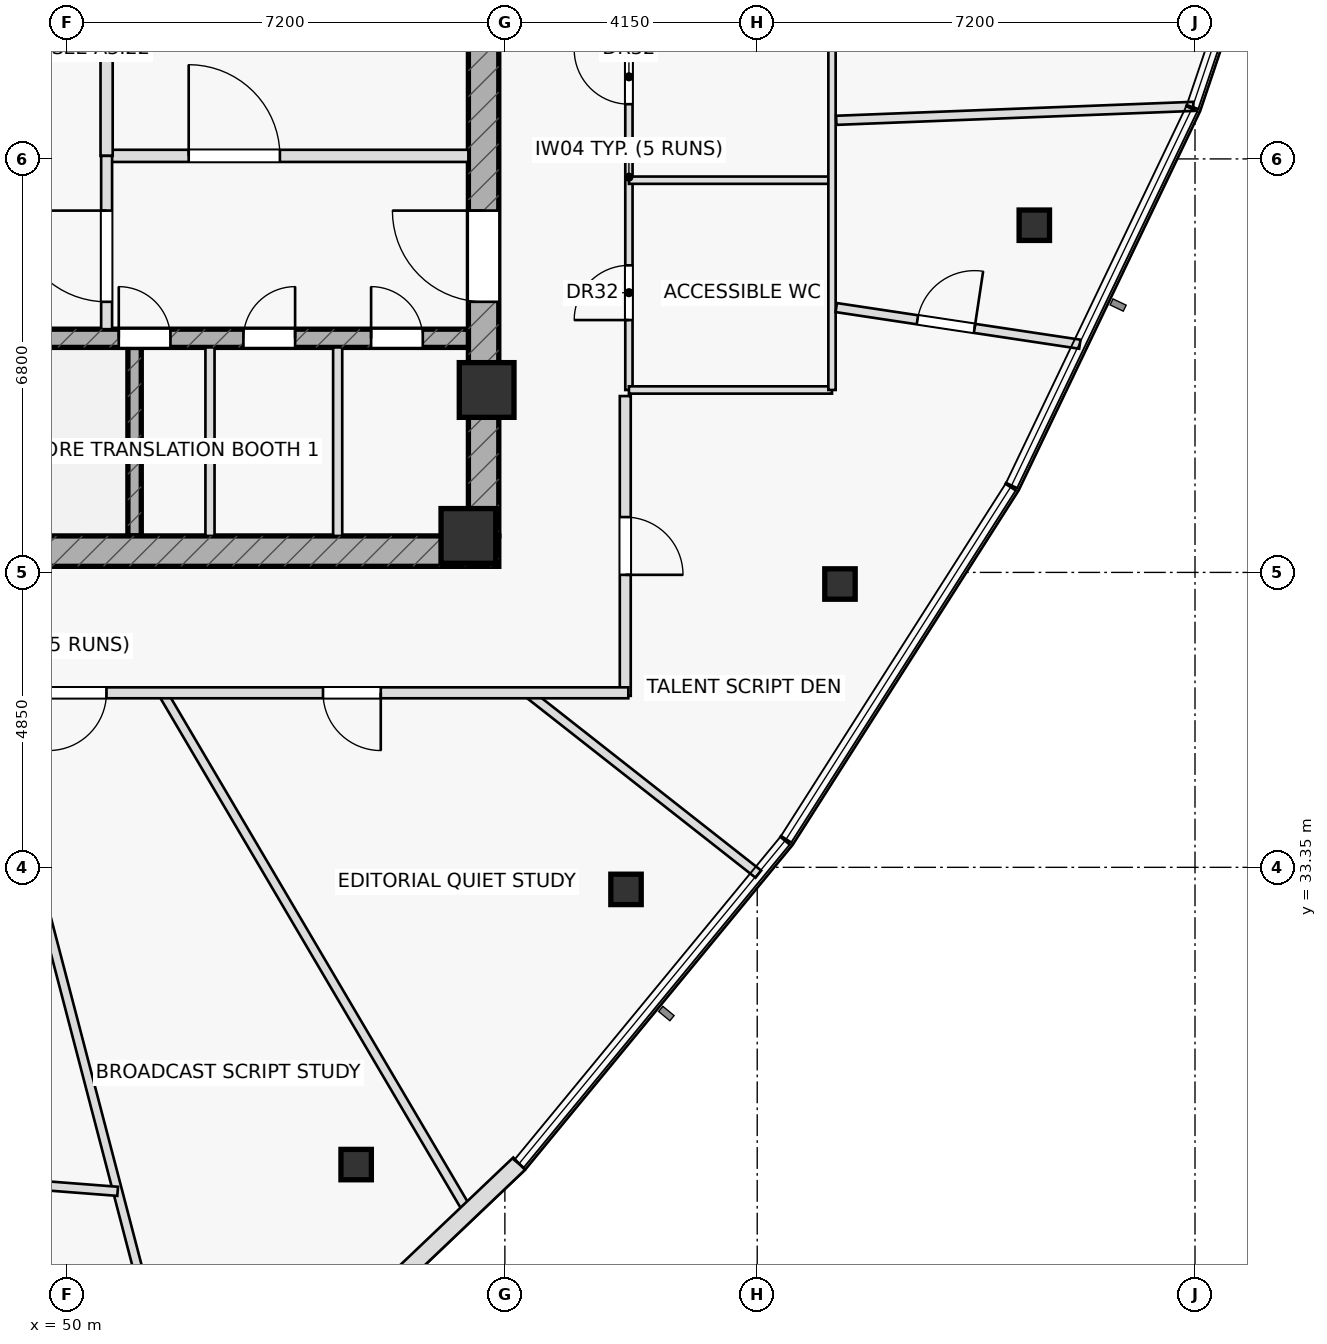
"""IFC4 building model, lengths in metres.
Left out: names, types, materials, properties, quantities, classifications, styles, units other than length and angle.
Written with IfcOpenShell. Run it as: python <this file> out.ifc"""

import sys

from ifc_helpers import new_model, si_unit, direction, frame, frame_2d, origin, origin_2d, place, context, subcontext, project, spatial, rectangle, hollow_rectangle, extrude, element, fill, save


model = new_model("IFC4")
c1 = context("Model", 3, precision=1e-05, world=origin(), true_north=direction((0.0, 1.0)))
c2 = subcontext(c1, "Body", "Model", "MODEL_VIEW")
j1 = project(units=[si_unit("LENGTHUNIT", "METRE"), si_unit("PLANEANGLEUNIT", "RADIAN")], contexts=[c1])
p1 = place(None, origin())
s1 = spatial("IfcSite", under=j1, at=p1, CompositionType="ELEMENT")
p2 = place(p1, origin())
s2 = spatial("IfcBuilding", under=s1, at=p2, CompositionType="ELEMENT")
p3 = place(p2, frame((0.0, 0.0, 269.55)))
s3 = spatial("IfcBuildingStorey", under=s2, at=p3, CompositionType="ELEMENT", Elevation=269.55)
p4 = place(p3, frame((51.11, 38.8, 0.0), z_axis=(0.0, 0.0, 1.0), x_axis=(0.0, 1.0, 0.0)))
e1 = element("IfcWall", 1, at=p4, inside=s3, PredefinedType="SHEAR", context=c2, shape_type="SweptSolid", body=[
    extrude(rectangle(XDim=3.1, YDim=0.22, at=frame_2d((1.55, 0.0))), origin(), (0.0, 0.0, 1.0), 3.5),
])
p5 = place(p3, frame((42.9, 38.55, 0.0), z_axis=(0.0, 0.0, 1.0), x_axis=(1.0, 0.0, 0.0)))
e2 = element("IfcWall", 2, at=p5, inside=s3, PredefinedType="SHEAR", context=c2, shape_type="SweptSolid", body=[
    extrude(rectangle(XDim=14.2, YDim=0.5, at=frame_2d((7.1, 0.0))), origin(), (0.0, 0.0, 1.0), 3.5),
])
p6 = place(p5, frame((0.78, 0.0, 0.0)))
e3 = element("IfcOpeningElement", 3, at=p6, cuts=e2, PredefinedType="OPENING", context=c2, shape_type="SweptSolid", body=[
    extrude(rectangle(XDim=1.05, YDim=2.2, at=frame_2d((0.525, 1.1))), frame((0.0, 0.26, 0.0), z_axis=(0.0, -1.0, 0.0), x_axis=(1.0, 0.0, 0.0)), (0.0, 0.0, 1.0), 0.52),
])
p7 = place(p3, frame((56.85, 38.8, 0.0), z_axis=(0.0, 0.0, 1.0), x_axis=(0.0, 1.0, 0.0)))
e4 = element("IfcWall", 4, at=p7, inside=s3, PredefinedType="SHEAR", context=c2, shape_type="SweptSolid", body=[
    extrude(rectangle(XDim=12.4, YDim=0.5, at=frame_2d((6.2, 0.0))), origin(), (0.0, 0.0, 1.0), 3.5),
])
p8 = place(p7, frame((3.85, 0.0, 0.0)))
e5 = element("IfcOpeningElement", 5, at=p8, cuts=e4, PredefinedType="OPENING", context=c2, shape_type="SweptSolid", body=[
    extrude(rectangle(XDim=1.5, YDim=2.2, at=frame_2d((0.75, 1.1))), frame((0.0, 0.26, 0.0), z_axis=(0.0, -1.0, 0.0), x_axis=(1.0, 0.0, 0.0)), (0.0, 0.0, 1.0), 0.52),
])
p9 = place(p3, frame((43.4, 42.05, 0.0), z_axis=(0.0, 0.0, 1.0), x_axis=(1.0, 0.0, 0.0)))
e6 = element("IfcWall", 6, at=p9, inside=s3, PredefinedType="SHEAR", context=c2, shape_type="SweptSolid", body=[
    extrude(rectangle(XDim=13.2, YDim=0.3, at=frame_2d((6.6, 0.0))), origin(), (0.0, 0.0, 1.0), 3.5),
])
p10 = place(p9, frame((7.45, 0.0, 0.0)))
e7 = element("IfcOpeningElement", 7, at=p10, cuts=e6, PredefinedType="OPENING", context=c2, shape_type="SweptSolid", body=[
    extrude(rectangle(XDim=0.85, YDim=2.05, at=frame_2d((0.425, 1.025))), frame((0.0, 0.16, 0.0), z_axis=(0.0, -1.0, 0.0), x_axis=(1.0, 0.0, 0.0)), (0.0, 0.0, 1.0), 0.32),
])
p11 = place(p9, frame((9.5, 0.0, 0.0)))
e8 = element("IfcOpeningElement", 8, at=p11, cuts=e6, PredefinedType="OPENING", context=c2, shape_type="SweptSolid", body=[
    extrude(rectangle(XDim=0.85, YDim=2.05, at=frame_2d((0.425, 1.025))), frame((0.0, 0.16, 0.0), z_axis=(0.0, -1.0, 0.0), x_axis=(1.0, 0.0, 0.0)), (0.0, 0.0, 1.0), 0.32),
])
p12 = place(p9, frame((11.6, 0.0, 0.0)))
e9 = element("IfcOpeningElement", 9, at=p12, cuts=e6, PredefinedType="OPENING", context=c2, shape_type="SweptSolid", body=[
    extrude(rectangle(XDim=0.85, YDim=2.05, at=frame_2d((0.425, 1.025))), frame((0.0, 0.16, 0.0), z_axis=(0.0, -1.0, 0.0), x_axis=(1.0, 0.0, 0.0)), (0.0, 0.0, 1.0), 0.32),
])
for number, where, z_axis, x_axis in (
    (10, (56.9, 41.2, 0.0), (0.0, 0.0, 1.0), (1.0, 0.0, 0.0)),
    (11, (56.6, 38.8, 0.0), (0.0, 0.0, 1.0), (1.0, 0.0, 0.0)),
):
    element("IfcColumn", number, at=place(p3, frame(where, z_axis=z_axis, x_axis=x_axis)), inside=s3, PredefinedType="COLUMN", context=c2, shape_type="SweptSolid", body=[
        extrude(rectangle(XDim=0.9, YDim=0.9, at=origin_2d()), origin(), (0.0, 0.0, 1.0), 3.5),
    ])
for number, where, z_axis, x_axis in (
    (12, (54.754, 28.462, 0.0), (0.0, 0.0, 1.0), (1.0, 0.0, 0.0)),
    (13, (59.192, 32.987, 0.0), (0.0, 0.0, 1.0), (1.0, 0.0, 0.0)),
    (14, (62.711, 38.009, 0.0), (0.0, 0.0, 1.0), (1.0, 0.0, 0.0)),
    (15, (65.907, 43.909, 0.0), (0.0, 0.0, 1.0), (1.0, 0.0, 0.0)),
):
    element("IfcColumn", number, at=place(p3, frame(where, z_axis=z_axis, x_axis=x_axis)), inside=s3, PredefinedType="COLUMN", context=c2, shape_type="SweptSolid", body=[
        extrude(hollow_rectangle(XDim=0.5, YDim=0.5, WallThickness=0.03, at=origin_2d()), origin(), (0.0, 0.0, 1.0), 3.5),
    ])
p13 = place(p3, frame((50.65, 45.05, 0.0), z_axis=(0.0, 0.0, 1.0), x_axis=(1.0, 0.0, 0.0)))
e16 = element("IfcWall", 16, at=p13, inside=s3, PredefinedType="PARTITIONING", context=c2, shape_type="SweptSolid", body=[
    extrude(rectangle(XDim=5.95, YDim=0.2, at=frame_2d((2.975, 0.0))), origin(), (0.0, 0.0, 1.0), 3.5),
])
p14 = place(p13, frame((1.35, 0.0, 0.0)))
e17 = element("IfcOpeningElement", 17, at=p14, cuts=e16, PredefinedType="OPENING", context=c2, shape_type="SweptSolid", body=[
    extrude(rectangle(XDim=1.5, YDim=2.2, at=frame_2d((0.75, 1.1))), frame((0.0, 0.11, 0.0), z_axis=(0.0, -1.0, 0.0), x_axis=(1.0, 0.0, 0.0)), (0.0, 0.0, 1.0), 0.22),
])
p15 = place(p3, frame((50.65, 45.05, 0.0), z_axis=(0.0, 0.0, 1.0), x_axis=(0.0, 1.0, 0.0)))
e18 = element("IfcWall", 18, at=p15, inside=s3, PredefinedType="PARTITIONING", context=c2, shape_type="SweptSolid", body=[
    extrude(rectangle(XDim=2.75, YDim=0.2, at=frame_2d((1.375, 0.0))), origin(), (0.0, 0.0, 1.0), 3.5),
])
p16 = place(p3, frame((50.65, 42.2, 0.0), z_axis=(0.0, 0.0, 1.0), x_axis=(0.0, 1.0, 0.0)))
e19 = element("IfcWall", 19, at=p16, inside=s3, PredefinedType="PARTITIONING", context=c2, shape_type="SweptSolid", body=[
    extrude(rectangle(XDim=2.85, YDim=0.18, at=frame_2d((1.425, 0.0))), origin(), (0.0, 0.0, 1.0), 3.5),
])
p17 = place(p16, frame((0.45, 0.0, 0.0)))
e20 = element("IfcOpeningElement", 20, at=p17, cuts=e19, PredefinedType="OPENING", context=c2, shape_type="SweptSolid", body=[
    extrude(rectangle(XDim=1.5, YDim=2.2, at=frame_2d((0.75, 1.1))), frame((0.0, 0.1, 0.0), z_axis=(0.0, -1.0, 0.0), x_axis=(1.0, 0.0, 0.0)), (0.0, 0.0, 1.0), 0.2),
])
for number, where, z_axis, x_axis in (
    (21, (52.35, 38.8, 0.0), (0.0, 0.0, 1.0), (0.0, 1.0, 0.0)),
    (22, (54.45, 38.8, 0.0), (0.0, 0.0, 1.0), (0.0, 1.0, 0.0)),
):
    element("IfcWall", number, at=place(p3, frame(where, z_axis=z_axis, x_axis=x_axis)), inside=s3, PredefinedType="PARTITIONING", context=c2, shape_type="SweptSolid", body=[
        extrude(rectangle(XDim=3.1, YDim=0.15, at=frame_2d((1.55, 0.0))), origin(), (0.0, 0.0, 1.0), 3.5),
    ])
p18 = place(p3, frame((59.24, 41.2, 0.0), z_axis=(0.0, 0.0, 1.0), x_axis=(0.0, 1.0, 0.0)))
e23 = element("IfcWall", 23, at=p18, inside=s3, PredefinedType="PARTITIONING", context=c2, shape_type="SweptSolid", body=[
    extrude(rectangle(XDim=7.0, YDim=0.12, at=frame_2d((3.5, 0.0))), origin(), (0.0, 0.0, 1.0), 3.5),
])
p19 = place(p18, frame((1.15, 0.0, 0.0)))
e24 = element("IfcOpeningElement", 24, at=p19, cuts=e23, PredefinedType="OPENING", context=c2, shape_type="SweptSolid", body=[
    extrude(rectangle(XDim=0.9, YDim=2.05, at=frame_2d((0.45, 1.025))), frame((0.0, 0.07, 0.0), z_axis=(0.0, -1.0, 0.0), x_axis=(1.0, 0.0, 0.0)), (0.0, 0.0, 1.0), 0.14),
])
p20 = place(p18, frame((4.7, 0.0, 0.0)))
e25 = element("IfcOpeningElement", 25, at=p20, cuts=e23, PredefinedType="OPENING", context=c2, shape_type="SweptSolid", body=[
    extrude(rectangle(XDim=0.9, YDim=2.05, at=frame_2d((0.45, 1.025))), frame((0.0, 0.07, 0.0), z_axis=(0.0, -1.0, 0.0), x_axis=(1.0, 0.0, 0.0)), (0.0, 0.0, 1.0), 0.14),
])
p21 = place(p3, frame((59.24, 41.2, 0.0), z_axis=(0.0, 0.0, 1.0), x_axis=(1.0, 0.0, 0.0)))
e26 = element("IfcWall", 26, at=p21, inside=s3, PredefinedType="PARTITIONING", context=c2, shape_type="SweptSolid", body=[
    extrude(rectangle(XDim=3.34, YDim=0.12, at=frame_2d((1.67, 0.0))), origin(), (0.0, 0.0, 1.0), 2.195),
])
p22 = place(p3, frame((59.24, 44.65, 0.0), z_axis=(0.0, 0.0, 1.0), x_axis=(1.0, 0.0, 0.0)))
e27 = element("IfcWall", 27, at=p22, inside=s3, PredefinedType="PARTITIONING", context=c2, shape_type="SweptSolid", body=[
    extrude(rectangle(XDim=3.34, YDim=0.12, at=frame_2d((1.67, 0.0))), origin(), (0.0, 0.0, 1.0), 3.5),
])
p23 = place(p3, frame((62.58, 41.2, 0.0), z_axis=(0.0, 0.0, 1.0), x_axis=(0.0, 1.0, 0.0)))
e28 = element("IfcWall", 28, at=p23, inside=s3, PredefinedType="PARTITIONING", context=c2, shape_type="SweptSolid", body=[
    extrude(rectangle(XDim=7.0, YDim=0.12, at=frame_2d((3.5, 0.0))), origin(), (0.0, 0.0, 1.0), 2.195),
])
p24 = place(p3, frame((48.692, 36.22, 0.0), z_axis=(0.0, 0.0, 1.0), x_axis=(0.25255026426, -0.967583776229, 0.0)))
e29 = element("IfcWall", 29, at=p24, inside=s3, PredefinedType="PARTITIONING", context=c2, shape_type="SweptSolid", body=[
    extrude(rectangle(XDim=13.239, YDim=0.15, at=frame_2d((6.62, 0.0))), origin(), (0.0, 0.0, 1.0), 2.195),
])
p25 = place(p3, frame((51.571, 36.22, 0.0), z_axis=(0.0, 0.0, 1.0), x_axis=(0.507449243591, -0.861681649555, 0.0)))
e30 = element("IfcWall", 30, at=p25, inside=s3, PredefinedType="PARTITIONING", context=c2, shape_type="SweptSolid", body=[
    extrude(rectangle(XDim=9.919, YDim=0.15, at=frame_2d((4.959, 0.0))), origin(), (0.0, 0.0, 1.0), 2.195),
])
p26 = place(p3, frame((57.574, 36.22, 0.0), z_axis=(0.0, 0.0, 1.0), x_axis=(0.786283227173, -0.617866236872, 0.0)))
e31 = element("IfcWall", 31, at=p26, inside=s3, PredefinedType="PARTITIONING", context=c2, shape_type="SweptSolid", body=[
    extrude(rectangle(XDim=4.826, YDim=0.15, at=frame_2d((2.413, 0.0))), origin(), (0.0, 0.0, 1.0), 2.195),
])
p27 = place(p3, frame((62.65, 42.555, 0.0), z_axis=(0.0, 0.0, 1.0), x_axis=(0.98886728479, -0.148800178337, 0.0)))
e32 = element("IfcWall", 32, at=p27, inside=s3, PredefinedType="PARTITIONING", context=c2, shape_type="SweptSolid", body=[
    extrude(rectangle(XDim=4.051, YDim=0.15, at=frame_2d((2.025, 0.0))), origin(), (0.0, 0.0, 1.0), 2.195),
])
p28 = place(p27, frame((1.35, 0.0, 0.0)))
e33 = element("IfcOpeningElement", 33, at=p28, cuts=e32, PredefinedType="OPENING", context=c2, shape_type="SweptSolid", body=[
    extrude(rectangle(XDim=0.95, YDim=2.05, at=frame_2d((0.475, 1.025))), frame((0.0, 0.085, 0.0), z_axis=(0.0, -1.0, 0.0), x_axis=(1.0, 0.0, 0.0)), (0.0, 0.0, 1.0), 0.17),
])
p29 = place(p3, frame((62.65, 45.635, 0.0), z_axis=(0.0, 0.0, 1.0), x_axis=(0.999237552825, 0.039042451561, 0.0)))
e34 = element("IfcWall", 34, at=p29, inside=s3, PredefinedType="PARTITIONING", context=c2, shape_type="SweptSolid", body=[
    extrude(rectangle(XDim=5.878, YDim=0.15, at=frame_2d((2.939, 0.0))), origin(), (0.0, 0.0, 1.0), 2.195),
])
p30 = place(p3, frame((38.537, 28.973, 0.0), z_axis=(0.0, 0.0, 1.0), x_axis=(0.997017686542, -0.077173393875, 0.0)))
e35 = element("IfcWall", 35, at=p30, inside=s3, PredefinedType="PARTITIONING", context=c2, shape_type="SweptSolid", body=[
    extrude(rectangle(XDim=12.332, YDim=0.15, at=frame_2d((6.166, 0.0))), origin(), (0.0, 0.0, 1.0), 2.195),
])
p31 = place(p30, frame((5.691, 0.0, 0.0)))
e36 = element("IfcOpeningElement", 36, at=p31, cuts=e35, PredefinedType="OPENING", context=c2, shape_type="SweptSolid", body=[
    extrude(rectangle(XDim=0.95, YDim=2.05, at=frame_2d((0.475, 1.025))), frame((0.0, 0.085, 0.0), z_axis=(0.0, -1.0, 0.0), x_axis=(1.0, 0.0, 0.0)), (0.0, 0.0, 1.0), 0.17),
])
p32 = place(p3, frame((59.18, 41.1, 0.0), z_axis=(0.0, 0.0, 1.0), x_axis=(0.0, -1.0, 0.0)))
e37 = element("IfcWall", 37, at=p32, inside=s3, PredefinedType="PARTITIONING", context=c2, shape_type="SweptSolid", body=[
    extrude(rectangle(XDim=4.93, YDim=0.18, at=frame_2d((2.465, 0.0))), origin(), (0.0, 0.0, 1.0), 2.195),
])
p33 = place(p32, frame((1.99, 0.0, 0.0)))
e38 = element("IfcOpeningElement", 38, at=p33, cuts=e37, PredefinedType="OPENING", context=c2, shape_type="SweptSolid", body=[
    extrude(rectangle(XDim=0.95, YDim=2.05, at=frame_2d((0.475, 1.025))), frame((0.0, 0.1, 0.0), z_axis=(0.0, -1.0, 0.0), x_axis=(1.0, 0.0, 0.0)), (0.0, 0.0, 1.0), 0.2),
])
p34 = place(p3, frame((59.23, 36.22, 0.0), z_axis=(0.0, 0.0, 1.0), x_axis=(-1.0, 0.0, 0.0)))
e39 = element("IfcWall", 39, at=p34, inside=s3, PredefinedType="PARTITIONING", context=c2, shape_type="SweptSolid", body=[
    extrude(rectangle(XDim=19.48, YDim=0.18, at=frame_2d((9.74, 0.0))), origin(), (0.0, 0.0, 1.0), 2.195),
])
p35 = place(p34, frame((4.071, 0.0, 0.0)))
e40 = element("IfcOpeningElement", 40, at=p35, cuts=e39, PredefinedType="OPENING", context=c2, shape_type="SweptSolid", body=[
    extrude(rectangle(XDim=0.95, YDim=2.05, at=frame_2d((0.475, 1.025))), frame((0.0, 0.1, 0.0), z_axis=(0.0, -1.0, 0.0), x_axis=(1.0, 0.0, 0.0)), (0.0, 0.0, 1.0), 0.2),
])
p36 = place(p34, frame((8.583, 0.0, 0.0)))
e41 = element("IfcOpeningElement", 41, at=p36, cuts=e39, PredefinedType="OPENING", context=c2, shape_type="SweptSolid", body=[
    extrude(rectangle(XDim=0.95, YDim=2.05, at=frame_2d((0.475, 1.025))), frame((0.0, 0.1, 0.0), z_axis=(0.0, -1.0, 0.0), x_axis=(1.0, 0.0, 0.0)), (0.0, 0.0, 1.0), 0.2),
])
p37 = place(p34, frame((13.372, 0.0, 0.0)))
e42 = element("IfcOpeningElement", 42, at=p37, cuts=e39, PredefinedType="OPENING", context=c2, shape_type="SweptSolid", body=[
    extrude(rectangle(XDim=0.95, YDim=2.05, at=frame_2d((0.475, 1.025))), frame((0.0, 0.1, 0.0), z_axis=(0.0, -1.0, 0.0), x_axis=(1.0, 0.0, 0.0)), (0.0, 0.0, 1.0), 0.2),
])
p38 = place(p34, frame((17.747, 0.0, 0.0)))
e43 = element("IfcOpeningElement", 43, at=p38, cuts=e39, PredefinedType="OPENING", context=c2, shape_type="SweptSolid", body=[
    extrude(rectangle(XDim=0.95, YDim=2.05, at=frame_2d((0.475, 1.025))), frame((0.0, 0.1, 0.0), z_axis=(0.0, -1.0, 0.0), x_axis=(1.0, 0.0, 0.0)), (0.0, 0.0, 1.0), 0.2),
])
p39 = place(p3, frame((52.423, 23.708, 0.0), z_axis=(0.0, 0.0, 1.0), x_axis=(0.724498737337, 0.68927612725, 0.0)))
e44 = element("IfcWall", 44, at=p39, inside=s3, PredefinedType="STANDARD", context=c2, shape_type="SweptSolid", body=[
    extrude(rectangle(XDim=6.917, YDim=0.28, at=frame_2d((3.459, 0.0))), origin(), (0.0, 0.0, 1.0), 3.5),
])
p40 = place(p8, origin())
e45 = element("IfcDoor", 45, at=p40, inside=s3, OperationType="SINGLE_SWING_RIGHT", PredefinedType="DOOR", context=c2, shape_type="SweptSolid", body=[
    extrude(rectangle(XDim=1.5, YDim=2.2, at=frame_2d((0.75, 1.1))), frame((0.0, 0.025, 0.0), z_axis=(0.0, -1.0, 0.0), x_axis=(1.0, 0.0, 0.0)), (0.0, 0.0, 1.0), 0.05),
])
fill(e5, e45)
p41 = place(p14, origin())
e46 = element("IfcDoor", 46, at=p41, inside=s3, OperationType="SINGLE_SWING_LEFT", PredefinedType="DOOR", context=c2, shape_type="SweptSolid", body=[
    extrude(rectangle(XDim=1.5, YDim=2.2, at=frame_2d((0.75, 1.1))), frame((0.0, 0.025, 0.0), z_axis=(0.0, -1.0, 0.0), x_axis=(1.0, 0.0, 0.0)), (0.0, 0.0, 1.0), 0.05),
])
fill(e17, e46)
p42 = place(p17, origin())
e47 = element("IfcDoor", 47, at=p42, inside=s3, OperationType="SINGLE_SWING_RIGHT", PredefinedType="DOOR", context=c2, shape_type="SweptSolid", body=[
    extrude(rectangle(XDim=1.5, YDim=2.2, at=frame_2d((0.75, 1.1))), frame((0.0, 0.025, 0.0), z_axis=(0.0, -1.0, 0.0), x_axis=(1.0, 0.0, 0.0)), (0.0, 0.0, 1.0), 0.05),
])
fill(e20, e47)
p43 = place(p10, origin())
e48 = element("IfcDoor", 48, at=p43, inside=s3, OperationType="SINGLE_SWING_LEFT", PredefinedType="DOOR", context=c2, shape_type="SweptSolid", body=[
    extrude(rectangle(XDim=0.85, YDim=2.05, at=frame_2d((0.425, 1.025))), frame((0.0, 0.025, 0.0), z_axis=(0.0, -1.0, 0.0), x_axis=(1.0, 0.0, 0.0)), (0.0, 0.0, 1.0), 0.05),
])
fill(e7, e48)
p44 = place(p11, origin())
e49 = element("IfcDoor", 49, at=p44, inside=s3, OperationType="SINGLE_SWING_RIGHT", PredefinedType="DOOR", context=c2, shape_type="SweptSolid", body=[
    extrude(rectangle(XDim=0.85, YDim=2.05, at=frame_2d((0.425, 1.025))), frame((0.0, 0.025, 0.0), z_axis=(0.0, -1.0, 0.0), x_axis=(1.0, 0.0, 0.0)), (0.0, 0.0, 1.0), 0.05),
])
fill(e8, e49)
p45 = place(p12, origin())
e50 = element("IfcDoor", 50, at=p45, inside=s3, OperationType="SINGLE_SWING_LEFT", PredefinedType="DOOR", context=c2, shape_type="SweptSolid", body=[
    extrude(rectangle(XDim=0.85, YDim=2.05, at=frame_2d((0.425, 1.025))), frame((0.0, 0.025, 0.0), z_axis=(0.0, -1.0, 0.0), x_axis=(1.0, 0.0, 0.0)), (0.0, 0.0, 1.0), 0.05),
])
fill(e9, e50)
p46 = place(p19, origin())
e51 = element("IfcDoor", 51, at=p46, inside=s3, OperationType="SINGLE_SWING_LEFT", PredefinedType="DOOR", context=c2, shape_type="SweptSolid", body=[
    extrude(rectangle(XDim=0.9, YDim=2.05, at=frame_2d((0.45, 1.025))), frame((0.0, 0.025, 0.0), z_axis=(0.0, -1.0, 0.0), x_axis=(1.0, 0.0, 0.0)), (0.0, 0.0, 1.0), 0.05),
])
fill(e24, e51)
p47 = place(p20, origin())
e52 = element("IfcDoor", 52, at=p47, inside=s3, OperationType="SINGLE_SWING_RIGHT", PredefinedType="DOOR", context=c2, shape_type="SweptSolid", body=[
    extrude(rectangle(XDim=0.9, YDim=2.05, at=frame_2d((0.45, 1.025))), frame((0.0, 0.025, 0.0), z_axis=(0.0, -1.0, 0.0), x_axis=(1.0, 0.0, 0.0)), (0.0, 0.0, 1.0), 0.05),
])
fill(e25, e52)
p48 = place(p28, origin())
e53 = element("IfcDoor", 53, at=p48, inside=s3, OperationType="SINGLE_SWING_RIGHT", PredefinedType="DOOR", context=c2, shape_type="SweptSolid", body=[
    extrude(rectangle(XDim=0.95, YDim=2.05, at=frame_2d((0.475, 1.025))), frame((0.0, 0.025, 0.0), z_axis=(0.0, -1.0, 0.0), x_axis=(1.0, 0.0, 0.0)), (0.0, 0.0, 1.0), 0.05),
])
fill(e33, e53)
p49 = place(p33, origin())
e54 = element("IfcDoor", 54, at=p49, inside=s3, OperationType="SINGLE_SWING_RIGHT", PredefinedType="DOOR", context=c2, shape_type="SweptSolid", body=[
    extrude(rectangle(XDim=0.95, YDim=2.05, at=frame_2d((0.475, 1.025))), frame((0.0, 0.025, 0.0), z_axis=(0.0, -1.0, 0.0), x_axis=(1.0, 0.0, 0.0)), (0.0, 0.0, 1.0), 0.05),
])
fill(e38, e54)
p50 = place(p35, origin())
e55 = element("IfcDoor", 55, at=p50, inside=s3, OperationType="SINGLE_SWING_LEFT", PredefinedType="DOOR", context=c2, shape_type="SweptSolid", body=[
    extrude(rectangle(XDim=0.95, YDim=2.05, at=frame_2d((0.475, 1.025))), frame((0.0, 0.025, 0.0), z_axis=(0.0, -1.0, 0.0), x_axis=(1.0, 0.0, 0.0)), (0.0, 0.0, 1.0), 0.05),
])
fill(e40, e55)
p51 = place(p36, origin())
e56 = element("IfcDoor", 56, at=p51, inside=s3, OperationType="SINGLE_SWING_RIGHT", PredefinedType="DOOR", context=c2, shape_type="SweptSolid", body=[
    extrude(rectangle(XDim=0.95, YDim=2.05, at=frame_2d((0.475, 1.025))), frame((0.0, 0.025, 0.0), z_axis=(0.0, -1.0, 0.0), x_axis=(1.0, 0.0, 0.0)), (0.0, 0.0, 1.0), 0.05),
])
fill(e41, e56)
save(model, sys.argv[1])
